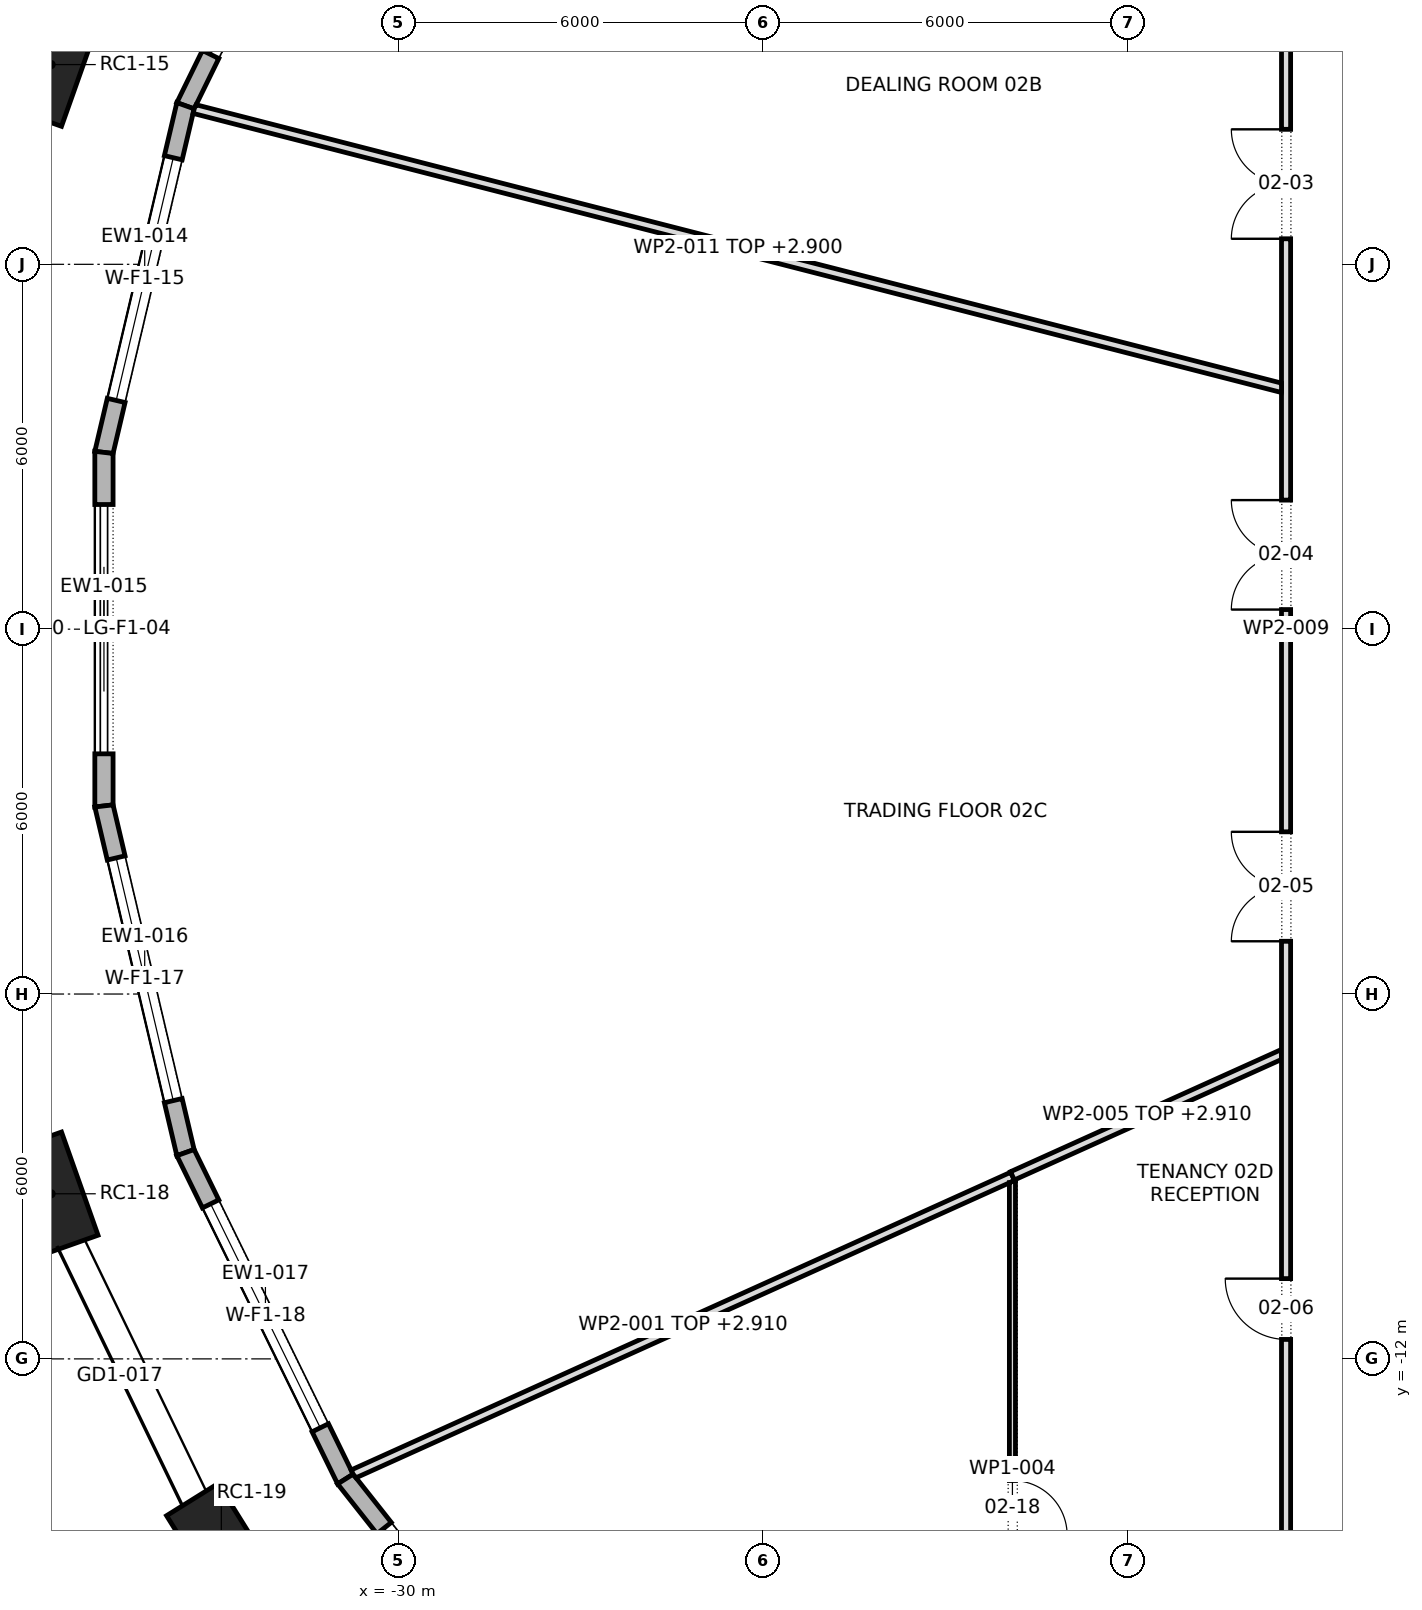
"""IFC4 building model, lengths in metres.
Left out: names, types, materials, properties, quantities, classifications, styles, units other than length and angle.
Written with IfcOpenShell. Run it as: python <this file> out.ifc"""

import sys

from ifc_helpers import new_model, si_unit, direction, frame, frame_2d, origin, origin_2d, place, context, subcontext, project, spatial, polyline, rectangle, outline, extrude, element, fill, save


model = new_model("IFC4")
c1 = context("Model", 3, precision=1e-05, world=origin(), true_north=direction((0.0, 1.0)))
c2 = subcontext(c1, "Body", "Model", "MODEL_VIEW")
j1 = project(units=[si_unit("LENGTHUNIT", "METRE"), si_unit("PLANEANGLEUNIT", "RADIAN")], contexts=[c1])
p1 = place(None, origin())
s1 = spatial("IfcSite", under=j1, at=p1, CompositionType="ELEMENT")
p2 = place(p1, origin())
s2 = spatial("IfcBuilding", under=s1, at=p2, CompositionType="ELEMENT")
p3 = place(p2, frame((0.0, 0.0, 44.5)))
s3 = spatial("IfcBuildingStorey", under=s2, at=p3, CompositionType="ELEMENT", Elevation=44.5)
for number, where, z_axis, x_axis in (
    (1, (-35.709, 9.285, 0.0), (0.0, 0.0, 1.0), (-0.334, -0.943, 0.0)),
    (2, (-35.709, -9.285, 0.0), (0.0, 0.0, 1.0), (0.334, -0.943, 0.0)),
    (3, (-32.91, -15.078, 0.0), (0.0, 0.0, 1.0), (0.529, -0.849, 0.0)),
):
    element("IfcColumn", number, at=place(p3, frame(where, z_axis=z_axis, x_axis=x_axis)), inside=s3, PredefinedType="COLUMN", context=c2, shape_type="SweptSolid", body=[
        extrude(rectangle(XDim=1.8, YDim=1.0, at=origin_2d()), origin(), (0.0, 0.0, 1.0), 4.2),
    ])
p4 = place(p3, frame((-30.869, 13.976, 0.0), z_axis=(0.0, 0.0, 1.0), x_axis=(-0.439896354052, -0.898048549741, 0.0)))
e4 = element("IfcWall", 4, at=p4, inside=s3, PredefinedType="STANDARD", context=c2, shape_type="SweptSolid", body=[
    extrude(outline(polyline([(-0.016, -0.15), (5.995, -0.15), (5.961, 0.15), (0.016, 0.15), (-0.016, -0.15)])), origin(), (0.0, 0.0, 1.0), 3.9),
])
p5 = place(p4, frame((0.939, 0.0, 0.6)))
e5 = element("IfcOpeningElement", 5, at=p5, cuts=e4, PredefinedType="OPENING", context=c2, shape_type="SweptSolid", body=[
    extrude(rectangle(XDim=4.1, YDim=2.85, at=frame_2d((2.05, 1.425))), frame((0.0, 0.162, 0.0), z_axis=(0.0, -1.0, 0.0), x_axis=(1.0, 0.0, 0.0)), (0.0, 0.0, 1.0), 0.324),
])
p6 = place(p3, frame((-33.499, 8.608, 0.0), z_axis=(0.0, 0.0, 1.0), x_axis=(-0.228976600496, -0.97343192696, 0.0)))
e6 = element("IfcWall", 6, at=p6, inside=s3, PredefinedType="STANDARD", context=c2, shape_type="SweptSolid", body=[
    extrude(outline(polyline([(-0.017, -0.15), (5.874, -0.15), (5.839, 0.15), (0.017, 0.15), (-0.017, -0.15)])), origin(), (0.0, 0.0, 1.0), 3.9),
])
p7 = place(p6, frame((0.878, 0.0, 0.6)))
e7 = element("IfcOpeningElement", 7, at=p7, cuts=e6, PredefinedType="OPENING", context=c2, shape_type="SweptSolid", body=[
    extrude(rectangle(XDim=4.1, YDim=2.85, at=frame_2d((2.05, 1.425))), frame((0.0, 0.162, 0.0), z_axis=(0.0, -1.0, 0.0), x_axis=(1.0, 0.0, 0.0)), (0.0, 0.0, 1.0), 0.324),
])
p8 = place(p3, frame((-34.84, 2.907, 0.0), z_axis=(0.0, 0.0, 1.0), x_axis=(0.0, -1.0, 0.0)))
e8 = element("IfcWall", 8, at=p8, inside=s3, PredefinedType="STANDARD", context=c2, shape_type="SweptSolid", body=[
    extrude(outline(polyline([(-0.017, -0.15), (5.831, -0.15), (5.796, 0.15), (0.017, 0.15), (-0.017, -0.15)])), origin(), (0.0, 0.0, 1.0), 3.9),
])
p9 = place(p8, frame((0.857, 0.0, 0.0)))
e9 = element("IfcOpeningElement", 9, at=p9, cuts=e8, PredefinedType="OPENING", context=c2, shape_type="SweptSolid", body=[
    extrude(rectangle(XDim=4.1, YDim=3.45, at=frame_2d((2.05, 1.725))), frame((0.0, 0.162, 0.0), z_axis=(0.0, -1.0, 0.0), x_axis=(1.0, 0.0, 0.0)), (0.0, 0.0, 1.0), 0.324),
])
p10 = place(p3, frame((-34.84, -2.907, 0.0), z_axis=(0.0, 0.0, 1.0), x_axis=(0.228976600496, -0.97343192696, 0.0)))
e10 = element("IfcWall", 10, at=p10, inside=s3, PredefinedType="STANDARD", context=c2, shape_type="SweptSolid", body=[
    extrude(outline(polyline([(-0.017, -0.15), (5.874, -0.15), (5.84, 0.15), (0.017, 0.15), (-0.017, -0.15)])), origin(), (0.0, 0.0, 1.0), 3.9),
])
p11 = place(p10, frame((0.878, 0.0, 0.6)))
e11 = element("IfcOpeningElement", 11, at=p11, cuts=e10, PredefinedType="OPENING", context=c2, shape_type="SweptSolid", body=[
    extrude(rectangle(XDim=4.1, YDim=2.85, at=frame_2d((2.05, 1.425))), frame((0.0, 0.162, 0.0), z_axis=(0.0, -1.0, 0.0), x_axis=(1.0, 0.0, 0.0)), (0.0, 0.0, 1.0), 0.324),
])
p12 = place(p3, frame((-33.499, -8.608, 0.0), z_axis=(0.0, 0.0, 1.0), x_axis=(0.439896354052, -0.898048549741, 0.0)))
e12 = element("IfcWall", 12, at=p12, inside=s3, PredefinedType="STANDARD", context=c2, shape_type="SweptSolid", body=[
    extrude(outline(polyline([(-0.017, -0.15), (5.994, -0.15), (5.962, 0.15), (0.017, 0.15), (-0.017, -0.15)])), origin(), (0.0, 0.0, 1.0), 3.9),
])
p13 = place(p12, frame((0.939, 0.0, 0.6)))
e13 = element("IfcOpeningElement", 13, at=p13, cuts=e12, PredefinedType="OPENING", context=c2, shape_type="SweptSolid", body=[
    extrude(rectangle(XDim=4.1, YDim=2.85, at=frame_2d((2.05, 1.425))), frame((0.0, 0.162, 0.0), z_axis=(0.0, -1.0, 0.0), x_axis=(1.0, 0.0, 0.0)), (0.0, 0.0, 1.0), 0.324),
])
p14 = place(p3, frame((-30.869, -13.976, 0.0), z_axis=(0.0, 0.0, 1.0), x_axis=(0.61992334328, -0.784662378642, 0.0)))
e14 = element("IfcWall", 14, at=p14, inside=s3, PredefinedType="STANDARD", context=c2, shape_type="SweptSolid", body=[
    extrude(outline(polyline([(-0.016, -0.15), (6.17, -0.15), (6.14, 0.15), (0.016, 0.15), (-0.016, -0.15)])), origin(), (0.0, 0.0, 1.0), 3.9),
])
p15 = place(p14, frame((1.027, 0.0, 0.6)))
e15 = element("IfcOpeningElement", 15, at=p15, cuts=e14, PredefinedType="OPENING", context=c2, shape_type="SweptSolid", body=[
    extrude(rectangle(XDim=4.1, YDim=2.85, at=frame_2d((2.05, 1.425))), frame((0.0, 0.162, 0.0), z_axis=(0.0, -1.0, 0.0), x_axis=(1.0, 0.0, 0.0)), (0.0, 0.0, 1.0), 0.324),
])
p16 = place(p3, frame((-30.744, -13.896, 0.0), z_axis=(0.0, 0.0, 1.0), x_axis=(0.91143189519, 0.411450969654, 0.0)))
e16 = element("IfcWall", 16, at=p16, inside=s3, PredefinedType="PARTITIONING", context=c2, shape_type="SweptSolid", body=[
    extrude(outline(polyline([(0.021, -0.075), (1.985, -0.075), (3.95, -0.075), (5.915, -0.075), (7.88, -0.075), (9.845, -0.075), (11.81, -0.075), (11.811, -0.073), (11.815, -0.075), (11.902, -0.075), (11.902, -0.066), (11.902, -0.066), (11.902, 0.062), (11.902, 0.075), (9.919, 0.075), (7.935, 0.075), (5.951, 0.075), (3.968, 0.075), (1.984, 0.075), (0.0, 0.075), (0.0, 0.066), (0.002, -0.001), (0.021, -0.075)])), origin(), (0.0, 0.0, 1.0), 2.91),
])
p17 = place(p3, frame((-19.9, -19.95, 0.0), z_axis=(0.0, 0.0, 1.0), x_axis=(0.0, 1.0, 0.0)))
e17 = element("IfcWall", 17, at=p17, inside=s3, PredefinedType="PARTITIONING", context=c2, shape_type="SweptSolid", body=[
    extrude(outline(polyline([(10.9, -0.05), (10.9, -0.049), (10.892, -0.031), (10.883, -0.034), (10.845, 0.05), (9.038, 0.05), (7.23, 0.05), (5.423, 0.05), (3.615, 0.05), (1.808, 0.05), (0.0, 0.05), (0.1, -0.05), (0.1, -0.05), (1.9, -0.05), (3.7, -0.05), (5.5, -0.05), (7.3, -0.05), (9.1, -0.05), (10.9, -0.05)])), origin(), (0.0, 0.0, 1.0), 3.9),
])
p18 = place(p17, frame((5.05, 0.0, 0.0)))
e18 = element("IfcOpeningElement", 18, at=p18, cuts=e17, PredefinedType="OPENING", context=c2, shape_type="SweptSolid", body=[
    extrude(rectangle(XDim=0.9, YDim=2.1, at=frame_2d((0.45, 1.05))), frame((0.0, 0.062, 0.0), z_axis=(0.0, -1.0, 0.0), x_axis=(1.0, 0.0, 0.0)), (0.0, 0.0, 1.0), 0.124),
])
p19 = place(p3, frame((-19.9, -8.99, 0.0), z_axis=(0.0, 0.0, 1.0), x_axis=(0.911546381607, 0.411197269178, 0.0)))
e19 = element("IfcWall", 19, at=p19, inside=s3, PredefinedType="PARTITIONING", context=c2, shape_type="SweptSolid", body=[
    extrude(outline(polyline([(0.02, -0.075), (1.62, -0.075), (3.22, -0.075), (4.821, -0.075), (4.888, 0.075), (3.259, 0.075), (1.629, 0.075), (0.0, 0.075), (0.0, -0.066), (0.02, -0.075)])), origin(), (0.0, 0.0, 1.0), 2.91),
])
p20 = place(p3, frame((-15.4, -15.475, 0.0), z_axis=(0.0, 0.0, 1.0), x_axis=(0.0, 1.0, 0.0)))
e20 = element("IfcWall", 20, at=p20, inside=s3, PredefinedType="PARTITIONING", context=c2, shape_type="SweptSolid", body=[
    extrude(outline(polyline([(0.15, -0.075), (2.066, -0.075), (3.981, -0.075), (5.897, -0.075), (7.812, -0.075), (9.728, -0.075), (11.644, -0.075), (13.56, -0.075), (15.475, -0.075), (17.391, -0.075), (19.306, -0.075), (21.222, -0.075), (23.138, -0.075), (25.053, -0.075), (26.969, -0.075), (28.885, -0.075), (30.8, -0.075), (30.95, 0.075), (29.016, 0.075), (27.081, 0.075), (25.147, 0.075), (23.212, 0.075), (21.278, 0.075), (19.344, 0.075), (17.409, 0.075), (15.475, 0.075), (13.541, 0.075), (11.606, 0.075), (9.672, 0.075), (7.738, 0.075), (5.803, 0.075), (3.869, 0.075), (1.935, 0.075), (0.0, 0.075), (0.15, -0.075)])), origin(), (0.0, 0.0, 1.0), 3.9),
])
p21 = place(p20, frame((28.02, 0.0, 0.0)))
e21 = element("IfcOpeningElement", 21, at=p21, cuts=e20, PredefinedType="OPENING", context=c2, shape_type="SweptSolid", body=[
    extrude(rectangle(XDim=1.0, YDim=2.1, at=frame_2d((0.5, 1.05))), frame((0.0, 0.087, 0.0), z_axis=(0.0, -1.0, 0.0), x_axis=(1.0, 0.0, 0.0)), (0.0, 0.0, 1.0), 0.174),
])
p22 = place(p20, frame((21.895, 0.0, 0.0)))
e22 = element("IfcOpeningElement", 22, at=p22, cuts=e20, PredefinedType="OPENING", context=c2, shape_type="SweptSolid", body=[
    extrude(rectangle(XDim=1.8, YDim=2.1, at=frame_2d((0.9, 1.05))), frame((0.0, 0.087, 0.0), z_axis=(0.0, -1.0, 0.0), x_axis=(1.0, 0.0, 0.0)), (0.0, 0.0, 1.0), 0.174),
])
p23 = place(p20, frame((15.798, 0.0, 0.0)))
e23 = element("IfcOpeningElement", 23, at=p23, cuts=e20, PredefinedType="OPENING", context=c2, shape_type="SweptSolid", body=[
    extrude(rectangle(XDim=1.8, YDim=2.1, at=frame_2d((0.9, 1.05))), frame((0.0, 0.087, 0.0), z_axis=(0.0, -1.0, 0.0), x_axis=(1.0, 0.0, 0.0)), (0.0, 0.0, 1.0), 0.174),
])
p24 = place(p20, frame((10.343, 0.0, 0.0)))
e24 = element("IfcOpeningElement", 24, at=p24, cuts=e20, PredefinedType="OPENING", context=c2, shape_type="SweptSolid", body=[
    extrude(rectangle(XDim=1.8, YDim=2.1, at=frame_2d((0.9, 1.05))), frame((0.0, 0.087, 0.0), z_axis=(0.0, -1.0, 0.0), x_axis=(1.0, 0.0, 0.0)), (0.0, 0.0, 1.0), 0.174),
])
p25 = place(p20, frame((3.795, 0.0, 0.0)))
e25 = element("IfcOpeningElement", 25, at=p25, cuts=e20, PredefinedType="OPENING", context=c2, shape_type="SweptSolid", body=[
    extrude(rectangle(XDim=1.0, YDim=2.1, at=frame_2d((0.5, 1.05))), frame((0.0, 0.087, 0.0), z_axis=(0.0, -1.0, 0.0), x_axis=(1.0, 0.0, 0.0)), (0.0, 0.0, 1.0), 0.174),
])
p26 = place(p3, frame((-15.457, 3.965, 0.0), z_axis=(0.0, 0.0, 1.0), x_axis=(-0.968658160146, 0.248397602209, 0.0)))
e26 = element("IfcWall", 26, at=p26, inside=s3, PredefinedType="PARTITIONING", context=c2, shape_type="SweptSolid", body=[
    extrude(outline(polyline([(0.038, -0.075), (1.881, -0.075), (3.723, -0.075), (5.566, -0.075), (7.409, -0.075), (9.251, -0.075), (11.094, -0.075), (12.937, -0.075), (14.779, -0.075), (16.622, -0.075), (18.465, -0.075), (18.478, -0.012), (18.478, 0.075), (16.63, 0.075), (14.782, 0.075), (12.935, 0.075), (11.087, 0.075), (9.239, 0.075), (7.391, 0.075), (5.543, 0.075), (3.696, 0.075), (1.848, 0.075), (0.0, 0.075), (0.0, 0.073), (0.038, -0.075)])), origin(), (0.0, 0.0, 1.0), 2.9),
])
p27 = place(p5, origin())
e27 = element("IfcWindow", 27, at=p27, inside=s3, PartitioningType="TRIPLE_PANEL_VERTICAL", PredefinedType="WINDOW", context=c2, shape_type="SweptSolid", body=[
    extrude(rectangle(XDim=4.1, YDim=2.85, at=frame_2d((2.05, 1.425))), frame((0.0, 0.03, 0.0), z_axis=(0.0, -1.0, 0.0), x_axis=(1.0, 0.0, 0.0)), (0.0, 0.0, 1.0), 0.06),
])
fill(e5, e27)
p28 = place(p7, origin())
e28 = element("IfcWindow", 28, at=p28, inside=s3, PartitioningType="TRIPLE_PANEL_VERTICAL", PredefinedType="WINDOW", context=c2, shape_type="SweptSolid", body=[
    extrude(rectangle(XDim=4.1, YDim=2.85, at=frame_2d((2.05, 1.425))), frame((0.0, 0.03, 0.0), z_axis=(0.0, -1.0, 0.0), x_axis=(1.0, 0.0, 0.0)), (0.0, 0.0, 1.0), 0.06),
])
fill(e7, e28)
p29 = place(p9, origin())
e29 = element("IfcDoor", 29, at=p29, inside=s3, OperationType="DOUBLE_DOOR_SLIDING", PredefinedType="DOOR", context=c2, shape_type="SweptSolid", body=[
    extrude(rectangle(XDim=4.1, YDim=3.45, at=frame_2d((2.05, 1.725))), frame((0.0, 0.025, 0.0), z_axis=(0.0, -1.0, 0.0), x_axis=(1.0, 0.0, 0.0)), (0.0, 0.0, 1.0), 0.05),
])
fill(e9, e29)
p30 = place(p11, origin())
e30 = element("IfcWindow", 30, at=p30, inside=s3, PartitioningType="TRIPLE_PANEL_VERTICAL", PredefinedType="WINDOW", context=c2, shape_type="SweptSolid", body=[
    extrude(rectangle(XDim=4.1, YDim=2.85, at=frame_2d((2.05, 1.425))), frame((0.0, 0.03, 0.0), z_axis=(0.0, -1.0, 0.0), x_axis=(1.0, 0.0, 0.0)), (0.0, 0.0, 1.0), 0.06),
])
fill(e11, e30)
p31 = place(p13, origin())
e31 = element("IfcWindow", 31, at=p31, inside=s3, PartitioningType="TRIPLE_PANEL_VERTICAL", PredefinedType="WINDOW", context=c2, shape_type="SweptSolid", body=[
    extrude(rectangle(XDim=4.1, YDim=2.85, at=frame_2d((2.05, 1.425))), frame((0.0, 0.03, 0.0), z_axis=(0.0, -1.0, 0.0), x_axis=(1.0, 0.0, 0.0)), (0.0, 0.0, 1.0), 0.06),
])
fill(e13, e31)
p32 = place(p15, origin())
e32 = element("IfcWindow", 32, at=p32, inside=s3, PartitioningType="TRIPLE_PANEL_VERTICAL", PredefinedType="WINDOW", context=c2, shape_type="SweptSolid", body=[
    extrude(rectangle(XDim=4.1, YDim=2.85, at=frame_2d((2.05, 1.425))), frame((0.0, 0.03, 0.0), z_axis=(0.0, -1.0, 0.0), x_axis=(1.0, 0.0, 0.0)), (0.0, 0.0, 1.0), 0.06),
])
fill(e15, e32)
p33 = place(p22, origin())
e33 = element("IfcDoor", 33, at=p33, inside=s3, OperationType="DOUBLE_DOOR_SINGLE_SWING", PredefinedType="DOOR", context=c2, shape_type="SweptSolid", body=[
    extrude(rectangle(XDim=1.8, YDim=2.1, at=frame_2d((0.9, 1.05))), frame((0.0, 0.025, 0.0), z_axis=(0.0, -1.0, 0.0), x_axis=(1.0, 0.0, 0.0)), (0.0, 0.0, 1.0), 0.05),
])
fill(e22, e33)
p34 = place(p23, origin())
e34 = element("IfcDoor", 34, at=p34, inside=s3, OperationType="DOUBLE_DOOR_SINGLE_SWING", PredefinedType="DOOR", context=c2, shape_type="SweptSolid", body=[
    extrude(rectangle(XDim=1.8, YDim=2.1, at=frame_2d((0.9, 1.05))), frame((0.0, 0.025, 0.0), z_axis=(0.0, -1.0, 0.0), x_axis=(1.0, 0.0, 0.0)), (0.0, 0.0, 1.0), 0.05),
])
fill(e23, e34)
p35 = place(p24, origin())
e35 = element("IfcDoor", 35, at=p35, inside=s3, OperationType="DOUBLE_DOOR_SINGLE_SWING", PredefinedType="DOOR", context=c2, shape_type="SweptSolid", body=[
    extrude(rectangle(XDim=1.8, YDim=2.1, at=frame_2d((0.9, 1.05))), frame((0.0, 0.025, 0.0), z_axis=(0.0, -1.0, 0.0), x_axis=(1.0, 0.0, 0.0)), (0.0, 0.0, 1.0), 0.05),
])
fill(e24, e35)
p36 = place(p25, origin())
e36 = element("IfcDoor", 36, at=p36, inside=s3, OperationType="SINGLE_SWING_LEFT", PredefinedType="DOOR", context=c2, shape_type="SweptSolid", body=[
    extrude(rectangle(XDim=1.0, YDim=2.1, at=frame_2d((0.5, 1.05))), frame((0.0, 0.025, 0.0), z_axis=(0.0, -1.0, 0.0), x_axis=(1.0, 0.0, 0.0)), (0.0, 0.0, 1.0), 0.05),
])
fill(e25, e36)
p37 = place(p18, frame((0.9, 0.0, 0.0), z_axis=(0.0, 0.0, 1.0), x_axis=(-1.0, 0.0, 0.0)))
e37 = element("IfcDoor", 37, at=p37, inside=s3, OperationType="SINGLE_SWING_LEFT", PredefinedType="DOOR", context=c2, shape_type="SweptSolid", body=[
    extrude(rectangle(XDim=0.9, YDim=2.1, at=frame_2d((0.45, 1.05))), frame((0.0, 0.025, 0.0), z_axis=(0.0, -1.0, 0.0), x_axis=(1.0, 0.0, 0.0)), (0.0, 0.0, 1.0), 0.05),
])
fill(e18, e37)
save(model, sys.argv[1])
